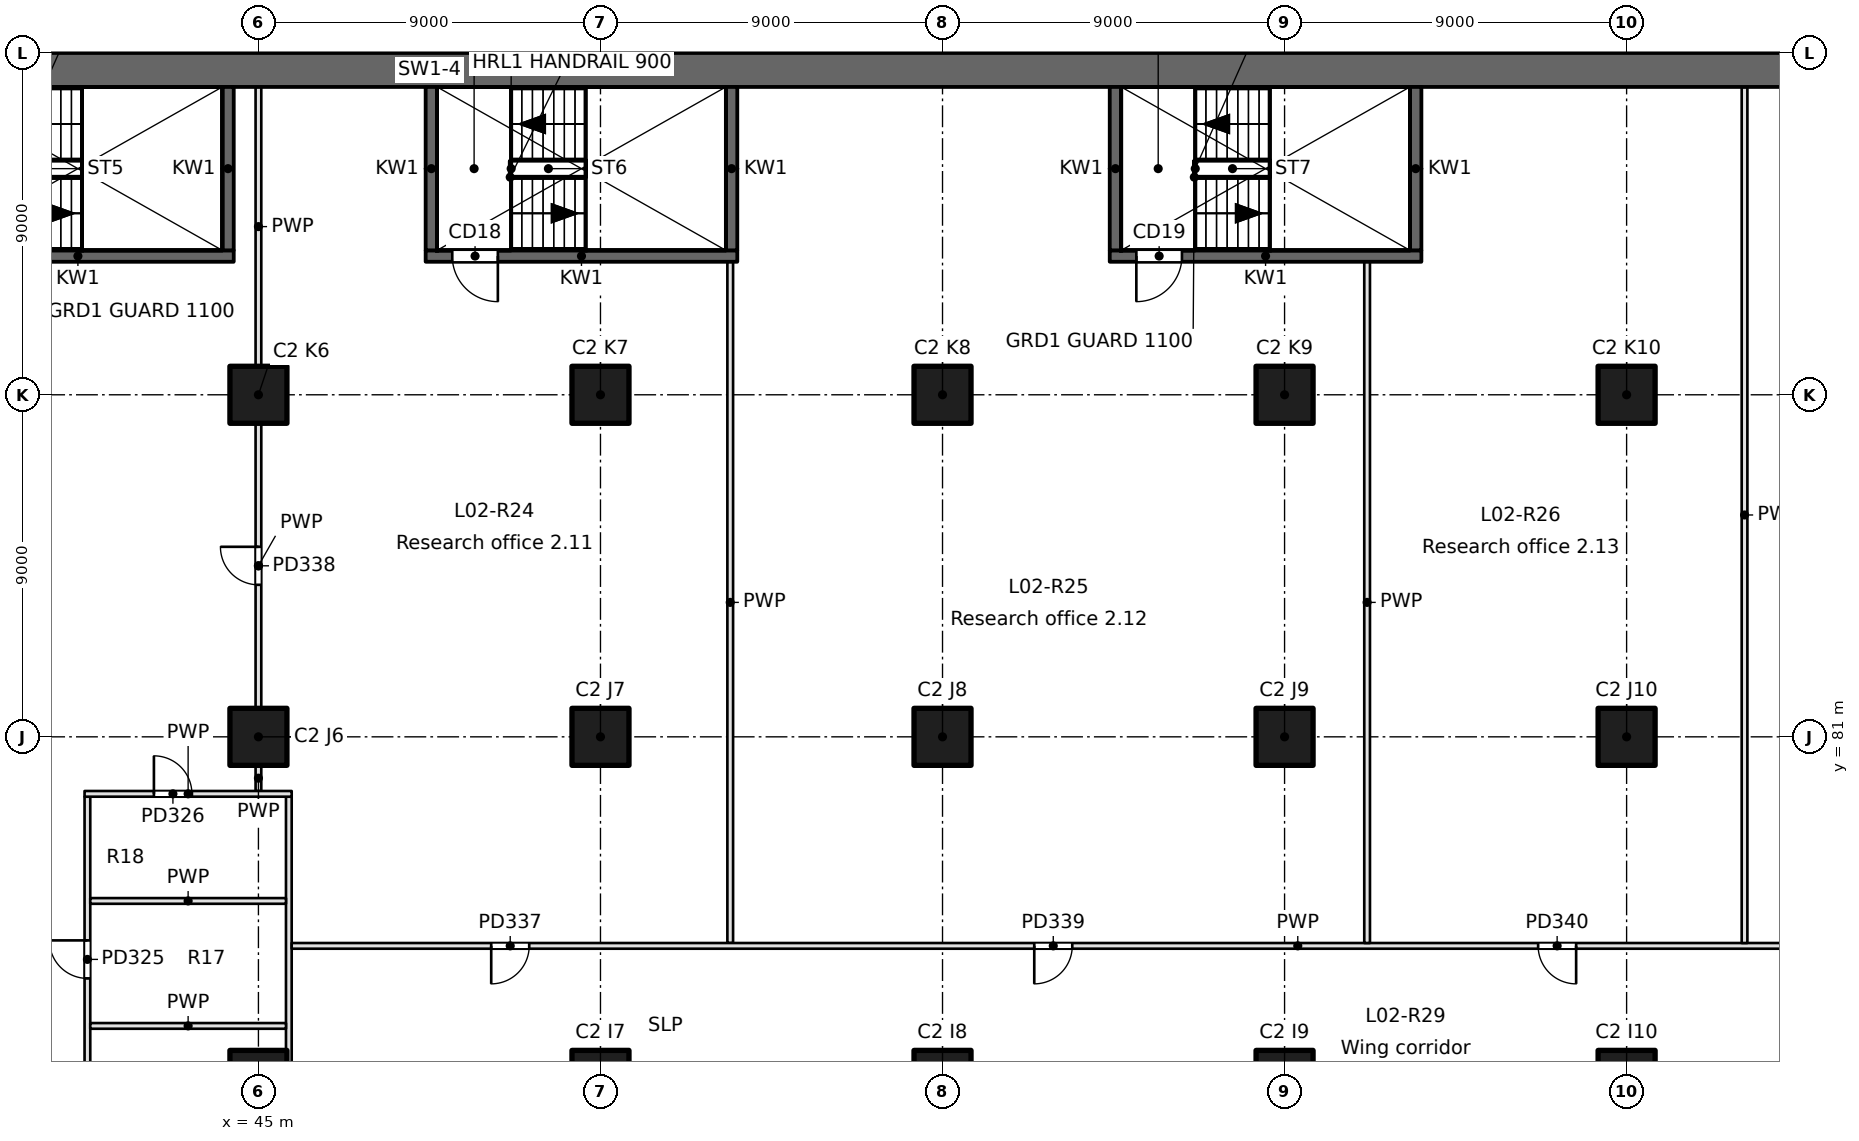
"""IFC4 building model, lengths in metres.
Left out: names, types, materials, properties, quantities, classifications, styles, units other than length and angle.
Written with IfcOpenShell. Run it as: python <this file> out.ifc"""

import sys

from ifc_helpers import new_model, si_unit, direction, frame, frame_2d, origin, origin_2d, place, context, subcontext, project, spatial, rectangle, extrude, element, fill, save


model = new_model("IFC4")
c1 = context("Model", 3, precision=1e-05, world=origin(), true_north=direction((0.0, 1.0)))
c2 = subcontext(c1, "Body", "Model", "MODEL_VIEW")
j1 = project(units=[si_unit("LENGTHUNIT", "METRE"), si_unit("PLANEANGLEUNIT", "RADIAN")], contexts=[c1])
p1 = place(None, origin())
s1 = spatial("IfcSite", under=j1, at=p1, CompositionType="ELEMENT")
p2 = place(p1, origin())
s2 = spatial("IfcBuilding", under=s1, at=p2, CompositionType="ELEMENT")
p3 = place(p2, frame((0.0, 0.0, 11.4)))
s3 = spatial("IfcBuildingStorey", under=s2, at=p3, CompositionType="ELEMENT", Elevation=11.4)
for number, where, z_axis, x_axis in (
    (1, (45.0, 72.0, 0.0), (0.0, 0.0, 1.0), (1.0, 0.0, 0.0)),
    (2, (45.0, 81.0, 0.0), (0.0, 0.0, 1.0), (1.0, 0.0, 0.0)),
    (3, (45.0, 90.0, 0.0), (0.0, 0.0, 1.0), (1.0, 0.0, 0.0)),
    (4, (54.0, 72.0, 0.0), (0.0, 0.0, 1.0), (1.0, 0.0, 0.0)),
    (5, (54.0, 81.0, 0.0), (0.0, 0.0, 1.0), (1.0, 0.0, 0.0)),
    (6, (54.0, 90.0, 0.0), (0.0, 0.0, 1.0), (1.0, 0.0, 0.0)),
    (7, (63.0, 72.0, 0.0), (0.0, 0.0, 1.0), (1.0, 0.0, 0.0)),
    (8, (63.0, 81.0, 0.0), (0.0, 0.0, 1.0), (1.0, 0.0, 0.0)),
    (9, (63.0, 90.0, 0.0), (0.0, 0.0, 1.0), (1.0, 0.0, 0.0)),
    (10, (72.0, 72.0, 0.0), (0.0, 0.0, 1.0), (1.0, 0.0, 0.0)),
    (11, (72.0, 81.0, 0.0), (0.0, 0.0, 1.0), (1.0, 0.0, 0.0)),
    (12, (72.0, 90.0, 0.0), (0.0, 0.0, 1.0), (1.0, 0.0, 0.0)),
    (13, (81.0, 72.0, 0.0), (0.0, 0.0, 1.0), (1.0, 0.0, 0.0)),
    (14, (81.0, 81.0, 0.0), (0.0, 0.0, 1.0), (1.0, 0.0, 0.0)),
    (15, (81.0, 90.0, 0.0), (0.0, 0.0, 1.0), (1.0, 0.0, 0.0)),
):
    element("IfcColumn", number, at=place(p3, frame(where, z_axis=z_axis, x_axis=x_axis)), inside=s3, PredefinedType="COLUMN", context=c2, shape_type="SweptSolid", body=[
        extrude(rectangle(XDim=1.5, YDim=1.5, at=origin_2d()), origin(), (0.0, 0.0, 1.0), 5.4),
    ])
p4 = place(p3, frame((94.5, 98.55, 0.0), z_axis=(0.0, 0.0, 1.0), x_axis=(-1.0, 0.0, 0.0)))
e16 = element("IfcWall", 16, at=p4, inside=s3, PredefinedType="SHEAR", context=c2, shape_type="SweptSolid", body=[
    extrude(rectangle(XDim=90.0, YDim=0.9, at=frame_2d((45.0, 0.0))), origin(), (0.0, 0.0, 1.0), 5.4),
])
p5 = place(p3, frame((36.15, 93.65, -0.35), z_axis=(0.0, 0.0, 1.0), x_axis=(1.0, 0.0, 0.0)))
e17 = element("IfcWall", 17, at=p5, inside=s3, PredefinedType="SOLIDWALL", context=c2, shape_type="SweptSolid", body=[
    extrude(rectangle(XDim=8.2, YDim=0.3, at=frame_2d((4.1, 0.0))), origin(), (0.0, 0.0, 1.0), 5.4),
])
p6 = place(p5, frame((0.7, 0.0, 0.35)))
e18 = element("IfcOpeningElement", 18, at=p6, cuts=e17, PredefinedType="OPENING", context=c2, shape_type="SweptSolid", body=[
    extrude(rectangle(XDim=1.2, YDim=2.1, at=frame_2d((0.6, 1.05))), frame((0.0, 0.15, 0.0), z_axis=(0.0, -1.0, 0.0), x_axis=(1.0, 0.0, 0.0)), (0.0, 0.0, 1.0), 0.3),
])
p7 = place(p3, frame((49.4, 93.65, -0.35), z_axis=(0.0, 0.0, 1.0), x_axis=(1.0, 0.0, 0.0)))
e19 = element("IfcWall", 19, at=p7, inside=s3, PredefinedType="SOLIDWALL", context=c2, shape_type="SweptSolid", body=[
    extrude(rectangle(XDim=8.2, YDim=0.3, at=frame_2d((4.1, 0.0))), origin(), (0.0, 0.0, 1.0), 5.4),
])
p8 = place(p7, frame((0.7, 0.0, 0.35)))
e20 = element("IfcOpeningElement", 20, at=p8, cuts=e19, PredefinedType="OPENING", context=c2, shape_type="SweptSolid", body=[
    extrude(rectangle(XDim=1.2, YDim=2.1, at=frame_2d((0.6, 1.05))), frame((0.0, 0.15, 0.0), z_axis=(0.0, -1.0, 0.0), x_axis=(1.0, 0.0, 0.0)), (0.0, 0.0, 1.0), 0.3),
])
p9 = place(p3, frame((67.4, 93.65, -0.35), z_axis=(0.0, 0.0, 1.0), x_axis=(1.0, 0.0, 0.0)))
e21 = element("IfcWall", 21, at=p9, inside=s3, PredefinedType="SOLIDWALL", context=c2, shape_type="SweptSolid", body=[
    extrude(rectangle(XDim=8.2, YDim=0.3, at=frame_2d((4.1, 0.0))), origin(), (0.0, 0.0, 1.0), 5.4),
])
p10 = place(p9, frame((0.7, 0.0, 0.35)))
e22 = element("IfcOpeningElement", 22, at=p10, cuts=e21, PredefinedType="OPENING", context=c2, shape_type="SweptSolid", body=[
    extrude(rectangle(XDim=1.2, YDim=2.1, at=frame_2d((0.6, 1.05))), frame((0.0, 0.15, 0.0), z_axis=(0.0, -1.0, 0.0), x_axis=(1.0, 0.0, 0.0)), (0.0, 0.0, 1.0), 0.3),
])
for number, where, z_axis, x_axis in (
    (23, (44.2, 93.8, -0.35), (0.0, 0.0, 1.0), (0.0, 1.0, 0.0)),
    (24, (49.55, 93.8, -0.35), (0.0, 0.0, 1.0), (0.0, 1.0, 0.0)),
    (25, (57.45, 93.8, -0.35), (0.0, 0.0, 1.0), (0.0, 1.0, 0.0)),
    (26, (67.55, 93.8, -0.35), (0.0, 0.0, 1.0), (0.0, 1.0, 0.0)),
    (27, (75.45, 93.8, -0.35), (0.0, 0.0, 1.0), (0.0, 1.0, 0.0)),
):
    element("IfcWall", number, at=place(p3, frame(where, z_axis=z_axis, x_axis=x_axis)), inside=s3, PredefinedType="SOLIDWALL", context=c2, shape_type="SweptSolid", body=[
        extrude(rectangle(XDim=4.3, YDim=0.3, at=frame_2d((2.15, 0.0))), origin(), (0.0, 0.0, 1.0), 5.4),
    ])
p11 = place(p3, frame((45.0, 79.575, 0.0), z_axis=(0.0, 0.0, 1.0), x_axis=(0.0, 1.0, 0.0)))
e28 = element("IfcWall", 28, at=p11, inside=s3, PredefinedType="PARTITIONING", context=c2, shape_type="SweptSolid", body=[
    extrude(rectangle(XDim=0.675, YDim=0.15, at=frame_2d((0.337, 0.0))), origin(), (0.0, 0.0, 1.0), 5.05),
])
p12 = place(p3, frame((45.0, 81.75, 0.0), z_axis=(0.0, 0.0, 1.0), x_axis=(0.0, 1.0, 0.0)))
e29 = element("IfcWall", 29, at=p12, inside=s3, PredefinedType="PARTITIONING", context=c2, shape_type="SweptSolid", body=[
    extrude(rectangle(XDim=7.5, YDim=0.15, at=frame_2d((3.75, 0.0))), origin(), (0.0, 0.0, 1.0), 5.05),
])
p13 = place(p12, frame((3.25, 0.0, 0.0)))
e30 = element("IfcOpeningElement", 30, at=p13, cuts=e29, PredefinedType="OPENING", context=c2, shape_type="SweptSolid", body=[
    extrude(rectangle(XDim=1.0, YDim=2.1, at=frame_2d((0.5, 1.05))), frame((0.0, 0.075, 0.0), z_axis=(0.0, -1.0, 0.0), x_axis=(1.0, 0.0, 0.0)), (0.0, 0.0, 1.0), 0.15),
])
p14 = place(p3, frame((45.0, 90.75, 0.0), z_axis=(0.0, 0.0, 1.0), x_axis=(0.0, 1.0, 0.0)))
e31 = element("IfcWall", 31, at=p14, inside=s3, PredefinedType="PARTITIONING", context=c2, shape_type="SweptSolid", body=[
    extrude(rectangle(XDim=7.35, YDim=0.15, at=frame_2d((3.675, 0.0))), origin(), (0.0, 0.0, 1.0), 5.05),
])
p15 = place(p3, frame((45.8, 79.425, 0.0), z_axis=(0.0, 0.0, 1.0), x_axis=(0.0, -1.0, 0.0)))
e32 = element("IfcWall", 32, at=p15, inside=s3, PredefinedType="PARTITIONING", context=c2, shape_type="SweptSolid", body=[
    extrude(rectangle(XDim=15.35, YDim=0.15, at=frame_2d((7.675, 0.0))), origin(), (0.0, 0.0, 1.0), 5.05),
])
p16 = place(p3, frame((40.5, 64.075, 0.0), z_axis=(0.0, 0.0, 1.0), x_axis=(0.0, 1.0, 0.0)))
e33 = element("IfcWall", 33, at=p16, inside=s3, PredefinedType="PARTITIONING", context=c2, shape_type="SweptSolid", body=[
    extrude(rectangle(XDim=15.35, YDim=0.15, at=frame_2d((7.675, 0.0))), origin(), (0.0, 0.0, 1.0), 5.05),
])
p17 = place(p16, frame((1.75, 0.0, 0.0)))
e34 = element("IfcOpeningElement", 34, at=p17, cuts=e33, PredefinedType="OPENING", context=c2, shape_type="SweptSolid", body=[
    extrude(rectangle(XDim=1.0, YDim=2.1, at=frame_2d((0.5, 1.05))), frame((0.0, 0.075, 0.0), z_axis=(0.0, -1.0, 0.0), x_axis=(1.0, 0.0, 0.0)), (0.0, 0.0, 1.0), 0.15),
])
p18 = place(p16, frame((6.372, 0.0, 0.0)))
e35 = element("IfcOpeningElement", 35, at=p18, cuts=e33, PredefinedType="OPENING", context=c2, shape_type="SweptSolid", body=[
    extrude(rectangle(XDim=1.0, YDim=2.1, at=frame_2d((0.5, 1.05))), frame((0.0, 0.075, 0.0), z_axis=(0.0, -1.0, 0.0), x_axis=(1.0, 0.0, 0.0)), (0.0, 0.0, 1.0), 0.15),
])
p19 = place(p16, frame((10.569, 0.0, 0.0)))
e36 = element("IfcOpeningElement", 36, at=p19, cuts=e33, PredefinedType="OPENING", context=c2, shape_type="SweptSolid", body=[
    extrude(rectangle(XDim=1.0, YDim=2.1, at=frame_2d((0.5, 1.05))), frame((0.0, 0.075, 0.0), z_axis=(0.0, -1.0, 0.0), x_axis=(1.0, 0.0, 0.0)), (0.0, 0.0, 1.0), 0.15),
])
for number, where, z_axis, x_axis in (
    (37, (40.575, 73.394, 0.0), (0.0, 0.0, 1.0), (1.0, 0.0, 0.0)),
    (38, (40.575, 76.682, 0.0), (0.0, 0.0, 1.0), (1.0, 0.0, 0.0)),
):
    element("IfcWall", number, at=place(p3, frame(where, z_axis=z_axis, x_axis=x_axis)), inside=s3, PredefinedType="PARTITIONING", context=c2, shape_type="SweptSolid", body=[
        extrude(rectangle(XDim=5.15, YDim=0.15, at=frame_2d((2.575, 0.0))), origin(), (0.0, 0.0, 1.0), 5.05),
    ])
p20 = place(p3, frame((40.425, 79.5, 0.0), z_axis=(0.0, 0.0, 1.0), x_axis=(1.0, 0.0, 0.0)))
e39 = element("IfcWall", 39, at=p20, inside=s3, PredefinedType="PARTITIONING", context=c2, shape_type="SweptSolid", body=[
    extrude(rectangle(XDim=5.45, YDim=0.15, at=frame_2d((2.725, 0.0))), origin(), (0.0, 0.0, 1.0), 5.05),
])
p21 = place(p20, frame((1.825, 0.0, 0.0)))
e40 = element("IfcOpeningElement", 40, at=p21, cuts=e39, PredefinedType="OPENING", context=c2, shape_type="SweptSolid", body=[
    extrude(rectangle(XDim=1.0, YDim=2.1, at=frame_2d((0.5, 1.05))), frame((0.0, 0.075, 0.0), z_axis=(0.0, -1.0, 0.0), x_axis=(1.0, 0.0, 0.0)), (0.0, 0.0, 1.0), 0.15),
])
p22 = place(p3, frame((57.414, 75.575, 0.0), z_axis=(0.0, 0.0, 1.0), x_axis=(0.0, 1.0, 0.0)))
e41 = element("IfcWall", 41, at=p22, inside=s3, PredefinedType="PARTITIONING", context=c2, shape_type="SweptSolid", body=[
    extrude(rectangle(XDim=17.925, YDim=0.15, at=frame_2d((8.962, 0.0))), origin(), (0.0, 0.0, 1.0), 5.05),
])
p23 = place(p3, frame((98.82, 75.5, 0.0), z_axis=(0.0, 0.0, 1.0), x_axis=(-1.0, 0.0, 0.0)))
e42 = element("IfcWall", 42, at=p23, inside=s3, PredefinedType="PARTITIONING", context=c2, shape_type="SweptSolid", body=[
    extrude(rectangle(XDim=52.945, YDim=0.15, at=frame_2d((26.473, 0.0))), origin(), (0.0, 0.0, 1.0), 5.05),
])
p24 = place(p23, frame((46.695, 0.0, 0.0)))
e43 = element("IfcOpeningElement", 43, at=p24, cuts=e42, PredefinedType="OPENING", context=c2, shape_type="SweptSolid", body=[
    extrude(rectangle(XDim=1.0, YDim=2.1, at=frame_2d((0.5, 1.05))), frame((0.0, 0.075, 0.0), z_axis=(0.0, -1.0, 0.0), x_axis=(1.0, 0.0, 0.0)), (0.0, 0.0, 1.0), 0.15),
])
p25 = place(p23, frame((32.406, 0.0, 0.0)))
e44 = element("IfcOpeningElement", 44, at=p25, cuts=e42, PredefinedType="OPENING", context=c2, shape_type="SweptSolid", body=[
    extrude(rectangle(XDim=1.0, YDim=2.1, at=frame_2d((0.5, 1.05))), frame((0.0, 0.075, 0.0), z_axis=(0.0, -1.0, 0.0), x_axis=(1.0, 0.0, 0.0)), (0.0, 0.0, 1.0), 0.15),
])
p26 = place(p23, frame((19.148, 0.0, 0.0)))
e45 = element("IfcOpeningElement", 45, at=p26, cuts=e42, PredefinedType="OPENING", context=c2, shape_type="SweptSolid", body=[
    extrude(rectangle(XDim=1.0, YDim=2.1, at=frame_2d((0.5, 1.05))), frame((0.0, 0.075, 0.0), z_axis=(0.0, -1.0, 0.0), x_axis=(1.0, 0.0, 0.0)), (0.0, 0.0, 1.0), 0.15),
])
p27 = place(p23, frame((6.967, 0.0, 0.0)))
e46 = element("IfcOpeningElement", 46, at=p27, cuts=e42, PredefinedType="OPENING", context=c2, shape_type="SweptSolid", body=[
    extrude(rectangle(XDim=1.0, YDim=2.1, at=frame_2d((0.5, 1.05))), frame((0.0, 0.075, 0.0), z_axis=(0.0, -1.0, 0.0), x_axis=(1.0, 0.0, 0.0)), (0.0, 0.0, 1.0), 0.15),
])
p28 = place(p3, frame((74.172, 75.575, 0.0), z_axis=(0.0, 0.0, 1.0), x_axis=(0.0, 1.0, 0.0)))
e47 = element("IfcWall", 47, at=p28, inside=s3, PredefinedType="PARTITIONING", context=c2, shape_type="SweptSolid", body=[
    extrude(rectangle(XDim=17.925, YDim=0.15, at=frame_2d((8.962, 0.0))), origin(), (0.0, 0.0, 1.0), 5.05),
])
p29 = place(p3, frame((84.103, 75.575, 0.0), z_axis=(0.0, 0.0, 1.0), x_axis=(0.0, 1.0, 0.0)))
e48 = element("IfcWall", 48, at=p29, inside=s3, PredefinedType="PARTITIONING", context=c2, shape_type="SweptSolid", body=[
    extrude(rectangle(XDim=22.525, YDim=0.15, at=frame_2d((11.263, 0.0))), origin(), (0.0, 0.0, 1.0), 5.05),
])
p30 = place(p8, frame((1.2, 0.0, 0.0), z_axis=(0.0, 0.0, 1.0), x_axis=(-1.0, 0.0, 0.0)))
e49 = element("IfcDoor", 49, at=p30, inside=s3, OperationType="SINGLE_SWING_LEFT", PredefinedType="DOOR", context=c2, shape_type="SweptSolid", body=[
    extrude(rectangle(XDim=1.2, YDim=2.1, at=frame_2d((0.6, 1.05))), frame((0.0, 0.025, 0.0), z_axis=(0.0, -1.0, 0.0), x_axis=(1.0, 0.0, 0.0)), (0.0, 0.0, 1.0), 0.05),
])
fill(e20, e49)
p31 = place(p10, frame((1.2, 0.0, 0.0), z_axis=(0.0, 0.0, 1.0), x_axis=(-1.0, 0.0, 0.0)))
e50 = element("IfcDoor", 50, at=p31, inside=s3, OperationType="SINGLE_SWING_RIGHT", PredefinedType="DOOR", context=c2, shape_type="SweptSolid", body=[
    extrude(rectangle(XDim=1.2, YDim=2.1, at=frame_2d((0.6, 1.05))), frame((0.0, 0.025, 0.0), z_axis=(0.0, -1.0, 0.0), x_axis=(1.0, 0.0, 0.0)), (0.0, 0.0, 1.0), 0.05),
])
fill(e22, e50)
p32 = place(p19, origin())
e51 = element("IfcDoor", 51, at=p32, inside=s3, OperationType="SINGLE_SWING_RIGHT", PredefinedType="DOOR", context=c2, shape_type="SweptSolid", body=[
    extrude(rectangle(XDim=1.0, YDim=2.1, at=frame_2d((0.5, 1.05))), frame((0.0, 0.025, 0.0), z_axis=(0.0, -1.0, 0.0), x_axis=(1.0, 0.0, 0.0)), (0.0, 0.0, 1.0), 0.05),
])
fill(e36, e51)
p33 = place(p21, origin())
e52 = element("IfcDoor", 52, at=p33, inside=s3, OperationType="SINGLE_SWING_LEFT", PredefinedType="DOOR", context=c2, shape_type="SweptSolid", body=[
    extrude(rectangle(XDim=1.0, YDim=2.1, at=frame_2d((0.5, 1.05))), frame((0.0, 0.025, 0.0), z_axis=(0.0, -1.0, 0.0), x_axis=(1.0, 0.0, 0.0)), (0.0, 0.0, 1.0), 0.05),
])
fill(e40, e52)
p34 = place(p24, origin())
e53 = element("IfcDoor", 53, at=p34, inside=s3, OperationType="SINGLE_SWING_RIGHT", PredefinedType="DOOR", context=c2, shape_type="SweptSolid", body=[
    extrude(rectangle(XDim=1.0, YDim=2.1, at=frame_2d((0.5, 1.05))), frame((0.0, 0.025, 0.0), z_axis=(0.0, -1.0, 0.0), x_axis=(1.0, 0.0, 0.0)), (0.0, 0.0, 1.0), 0.05),
])
fill(e43, e53)
p35 = place(p13, origin())
e54 = element("IfcDoor", 54, at=p35, inside=s3, OperationType="SINGLE_SWING_RIGHT", PredefinedType="DOOR", context=c2, shape_type="SweptSolid", body=[
    extrude(rectangle(XDim=1.0, YDim=2.1, at=frame_2d((0.5, 1.05))), frame((0.0, 0.025, 0.0), z_axis=(0.0, -1.0, 0.0), x_axis=(1.0, 0.0, 0.0)), (0.0, 0.0, 1.0), 0.05),
])
fill(e30, e54)
p36 = place(p25, origin())
e55 = element("IfcDoor", 55, at=p36, inside=s3, OperationType="SINGLE_SWING_RIGHT", PredefinedType="DOOR", context=c2, shape_type="SweptSolid", body=[
    extrude(rectangle(XDim=1.0, YDim=2.1, at=frame_2d((0.5, 1.05))), frame((0.0, 0.025, 0.0), z_axis=(0.0, -1.0, 0.0), x_axis=(1.0, 0.0, 0.0)), (0.0, 0.0, 1.0), 0.05),
])
fill(e44, e55)
p37 = place(p26, origin())
e56 = element("IfcDoor", 56, at=p37, inside=s3, OperationType="SINGLE_SWING_LEFT", PredefinedType="DOOR", context=c2, shape_type="SweptSolid", body=[
    extrude(rectangle(XDim=1.0, YDim=2.1, at=frame_2d((0.5, 1.05))), frame((0.0, 0.025, 0.0), z_axis=(0.0, -1.0, 0.0), x_axis=(1.0, 0.0, 0.0)), (0.0, 0.0, 1.0), 0.05),
])
fill(e45, e56)
save(model, sys.argv[1])
